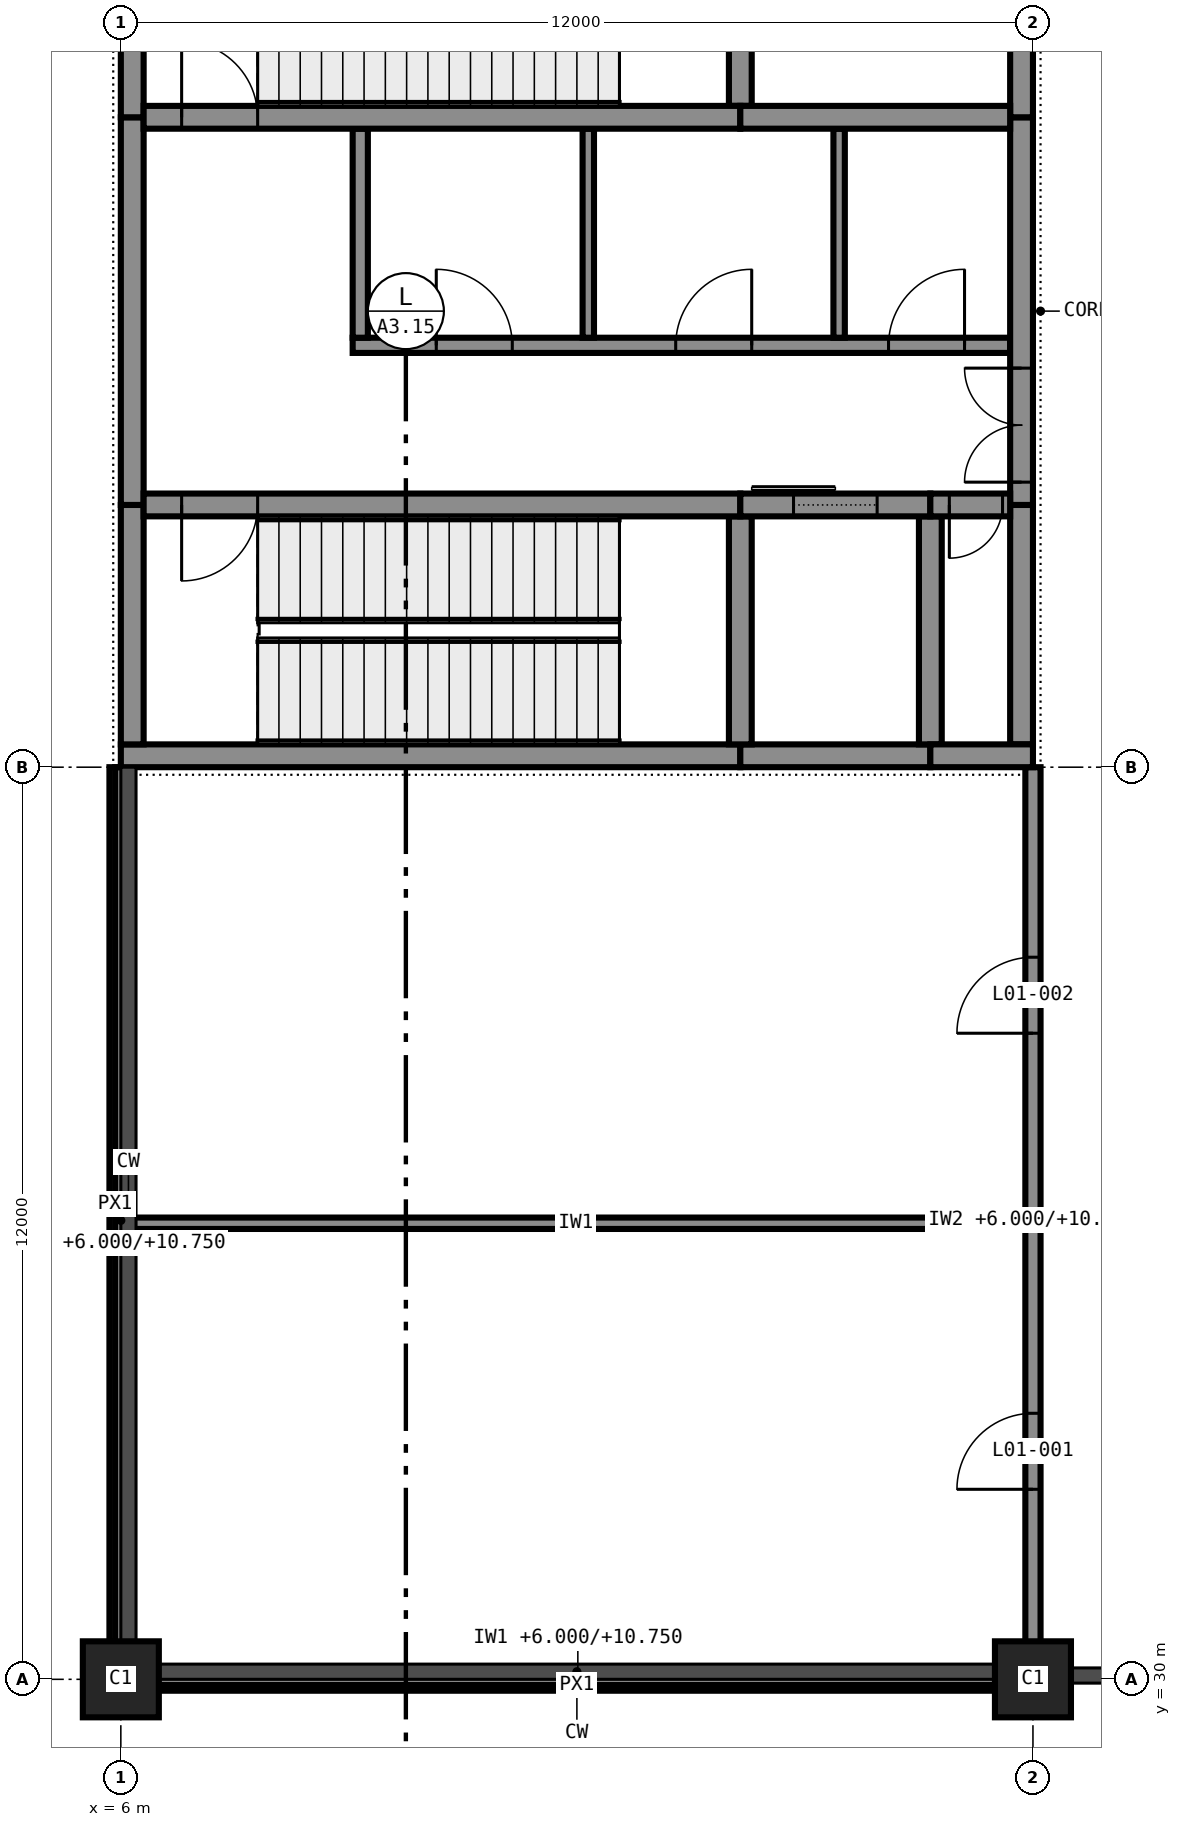
"""IFC4 building model, lengths in metres.
Left out: names, types, materials, properties, quantities, classifications, styles, units other than length and angle.
Written with IfcOpenShell. Run it as: python <this file> out.ifc"""

import sys

from ifc_helpers import new_model, si_unit, direction, frame, frame_2d, origin, origin_2d, place, context, subcontext, project, spatial, rectangle, extrude, element, fill, save


model = new_model("IFC4")
c1 = context("Model", 3, precision=1e-05, world=origin(), true_north=direction((0.0, 1.0)))
c2 = subcontext(c1, "Body", "Model", "MODEL_VIEW")
j1 = project(units=[si_unit("LENGTHUNIT", "METRE"), si_unit("PLANEANGLEUNIT", "RADIAN")], contexts=[c1])
p1 = place(None, origin())
s1 = spatial("IfcSite", under=j1, at=p1, CompositionType="ELEMENT")
p2 = place(p1, origin())
s2 = spatial("IfcBuilding", under=s1, at=p2, CompositionType="ELEMENT")
p3 = place(p2, frame((0.0, 0.0, 6.0)))
s3 = spatial("IfcBuildingStorey", under=s2, at=p3, CompositionType="ELEMENT", Elevation=6.0)
for number, where, z_axis, x_axis in (
    (1, (6.0, 30.0, 0.0), (0.0, 0.0, 1.0), (1.0, 0.0, 0.0)),
    (2, (18.0, 30.0, 0.0), (0.0, 0.0, 1.0), (1.0, 0.0, 0.0)),
):
    element("IfcColumn", number, at=place(p3, frame(where, z_axis=z_axis, x_axis=x_axis)), inside=s3, PredefinedType="COLUMN", context=c2, shape_type="SweptSolid", body=[
        extrude(rectangle(XDim=1.0, YDim=1.0, at=origin_2d()), origin(), (0.0, 0.0, 1.0), 6.0),
    ])
p4 = place(p3, frame((6.0, 42.15, 0.0), z_axis=(0.0, 0.0, 1.0), x_axis=(1.0, 0.0, 0.0)))
e3 = element("IfcWall", 3, at=p4, inside=s3, PredefinedType="SHEAR", context=c2, shape_type="SweptSolid", body=[
    extrude(rectangle(XDim=8.15, YDim=0.3, at=frame_2d((4.075, 0.0))), origin(), (0.0, 0.0, 1.0), 5.75),
])
p5 = place(p3, frame((14.15, 42.15, 0.0), z_axis=(0.0, 0.0, 1.0), x_axis=(1.0, 0.0, 0.0)))
e4 = element("IfcWall", 4, at=p5, inside=s3, PredefinedType="SHEAR", context=c2, shape_type="SweptSolid", body=[
    extrude(rectangle(XDim=2.5, YDim=0.3, at=frame_2d((1.25, 0.0))), origin(), (0.0, 0.0, 1.0), 5.75),
])
p6 = place(p3, frame((16.65, 42.15, 0.0), z_axis=(0.0, 0.0, 1.0), x_axis=(1.0, 0.0, 0.0)))
e5 = element("IfcWall", 5, at=p6, inside=s3, PredefinedType="SHEAR", context=c2, shape_type="SweptSolid", body=[
    extrude(rectangle(XDim=1.35, YDim=0.3, at=frame_2d((0.675, 0.0))), origin(), (0.0, 0.0, 1.0), 5.75),
])
p7 = place(p3, frame((6.3, 45.45, 0.0), z_axis=(0.0, 0.0, 1.0), x_axis=(1.0, 0.0, 0.0)))
e6 = element("IfcWall", 6, at=p7, inside=s3, PredefinedType="SHEAR", context=c2, shape_type="SweptSolid", body=[
    extrude(rectangle(XDim=7.85, YDim=0.3, at=frame_2d((3.925, 0.0))), origin(), (0.0, 0.0, 1.0), 5.75),
])
p8 = place(p7, frame((0.5, 0.0, 0.0)))
e7 = element("IfcOpeningElement", 7, at=p8, cuts=e6, PredefinedType="OPENING", context=c2, shape_type="SweptSolid", body=[
    extrude(rectangle(XDim=1.0, YDim=2.1, at=frame_2d((0.5, 1.05))), frame((0.0, 0.16, 0.0), z_axis=(0.0, -1.0, 0.0), x_axis=(1.0, 0.0, 0.0)), (0.0, 0.0, 1.0), 0.32),
])
p9 = place(p3, frame((14.15, 45.45, 0.0), z_axis=(0.0, 0.0, 1.0), x_axis=(1.0, 0.0, 0.0)))
e8 = element("IfcWall", 8, at=p9, inside=s3, PredefinedType="SHEAR", context=c2, shape_type="SweptSolid", body=[
    extrude(rectangle(XDim=2.5, YDim=0.3, at=frame_2d((1.25, 0.0))), origin(), (0.0, 0.0, 1.0), 5.75),
])
p10 = place(p9, frame((0.7, 0.0, 0.0)))
e9 = element("IfcOpeningElement", 9, at=p10, cuts=e8, PredefinedType="OPENING", context=c2, shape_type="SweptSolid", body=[
    extrude(rectangle(XDim=1.1, YDim=2.1, at=frame_2d((0.55, 1.05))), frame((0.0, 0.16, 0.0), z_axis=(0.0, -1.0, 0.0), x_axis=(1.0, 0.0, 0.0)), (0.0, 0.0, 1.0), 0.32),
])
p11 = place(p3, frame((16.65, 45.45, 0.0), z_axis=(0.0, 0.0, 1.0), x_axis=(1.0, 0.0, 0.0)))
e10 = element("IfcWall", 10, at=p11, inside=s3, PredefinedType="SHEAR", context=c2, shape_type="SweptSolid", body=[
    extrude(rectangle(XDim=1.05, YDim=0.3, at=frame_2d((0.525, 0.0))), origin(), (0.0, 0.0, 1.0), 5.75),
])
p12 = place(p11, frame((0.25, 0.0, 0.0)))
e11 = element("IfcOpeningElement", 11, at=p12, cuts=e10, PredefinedType="OPENING", context=c2, shape_type="SweptSolid", body=[
    extrude(rectangle(XDim=0.7, YDim=2.1, at=frame_2d((0.35, 1.05))), frame((0.0, 0.16, 0.0), z_axis=(0.0, -1.0, 0.0), x_axis=(1.0, 0.0, 0.0)), (0.0, 0.0, 1.0), 0.32),
])
p13 = place(p3, frame((6.3, 50.55, 0.0), z_axis=(0.0, 0.0, 1.0), x_axis=(1.0, 0.0, 0.0)))
e12 = element("IfcWall", 12, at=p13, inside=s3, PredefinedType="SHEAR", context=c2, shape_type="SweptSolid", body=[
    extrude(rectangle(XDim=7.85, YDim=0.3, at=frame_2d((3.925, 0.0))), origin(), (0.0, 0.0, 1.0), 5.75),
])
p14 = place(p13, frame((0.5, 0.0, 0.0)))
e13 = element("IfcOpeningElement", 13, at=p14, cuts=e12, PredefinedType="OPENING", context=c2, shape_type="SweptSolid", body=[
    extrude(rectangle(XDim=1.0, YDim=2.1, at=frame_2d((0.5, 1.05))), frame((0.0, 0.16, 0.0), z_axis=(0.0, -1.0, 0.0), x_axis=(1.0, 0.0, 0.0)), (0.0, 0.0, 1.0), 0.32),
])
p15 = place(p3, frame((14.15, 50.55, 0.0), z_axis=(0.0, 0.0, 1.0), x_axis=(1.0, 0.0, 0.0)))
e14 = element("IfcWall", 14, at=p15, inside=s3, PredefinedType="SHEAR", context=c2, shape_type="SweptSolid", body=[
    extrude(rectangle(XDim=3.55, YDim=0.3, at=frame_2d((1.775, 0.0))), origin(), (0.0, 0.0, 1.0), 5.75),
])
p16 = place(p3, frame((6.15, 42.3, 0.0), z_axis=(0.0, 0.0, 1.0), x_axis=(0.0, 1.0, 0.0)))
e15 = element("IfcWall", 15, at=p16, inside=s3, PredefinedType="SHEAR", context=c2, shape_type="SweptSolid", body=[
    extrude(rectangle(XDim=3.15, YDim=0.3, at=frame_2d((1.575, 0.0))), origin(), (0.0, 0.0, 1.0), 5.75),
])
p17 = place(p3, frame((6.15, 45.45, 0.0), z_axis=(0.0, 0.0, 1.0), x_axis=(0.0, 1.0, 0.0)))
e16 = element("IfcWall", 16, at=p17, inside=s3, PredefinedType="SHEAR", context=c2, shape_type="SweptSolid", body=[
    extrude(rectangle(XDim=5.1, YDim=0.3, at=frame_2d((2.55, 0.0))), origin(), (0.0, 0.0, 1.0), 5.75),
])
p18 = place(p3, frame((6.15, 50.55, 0.0), z_axis=(0.0, 0.0, 1.0), x_axis=(0.0, 1.0, 0.0)))
e17 = element("IfcWall", 17, at=p18, inside=s3, PredefinedType="SHEAR", context=c2, shape_type="SweptSolid", body=[
    extrude(rectangle(XDim=3.45, YDim=0.3, at=frame_2d((1.725, 0.0))), origin(), (0.0, 0.0, 1.0), 5.75),
])
p19 = place(p3, frame((17.85, 42.3, 0.0), z_axis=(0.0, 0.0, 1.0), x_axis=(0.0, 1.0, 0.0)))
e18 = element("IfcWall", 18, at=p19, inside=s3, PredefinedType="SHEAR", context=c2, shape_type="SweptSolid", body=[
    extrude(rectangle(XDim=3.15, YDim=0.3, at=frame_2d((1.575, 0.0))), origin(), (0.0, 0.0, 1.0), 5.75),
])
p20 = place(p3, frame((17.85, 45.45, 0.0), z_axis=(0.0, 0.0, 1.0), x_axis=(0.0, 1.0, 0.0)))
e19 = element("IfcWall", 19, at=p20, inside=s3, PredefinedType="SHEAR", context=c2, shape_type="SweptSolid", body=[
    extrude(rectangle(XDim=5.1, YDim=0.3, at=frame_2d((2.55, 0.0))), origin(), (0.0, 0.0, 1.0), 5.75),
])
p21 = place(p20, frame((0.3, 0.0, 0.0)))
e20 = element("IfcOpeningElement", 20, at=p21, cuts=e19, PredefinedType="OPENING", context=c2, shape_type="SweptSolid", body=[
    extrude(rectangle(XDim=1.5, YDim=2.1, at=frame_2d((0.75, 1.05))), frame((0.0, 0.16, 0.0), z_axis=(0.0, -1.0, 0.0), x_axis=(1.0, 0.0, 0.0)), (0.0, 0.0, 1.0), 0.32),
])
p22 = place(p3, frame((17.85, 50.55, 0.0), z_axis=(0.0, 0.0, 1.0), x_axis=(0.0, 1.0, 0.0)))
e21 = element("IfcWall", 21, at=p22, inside=s3, PredefinedType="SHEAR", context=c2, shape_type="SweptSolid", body=[
    extrude(rectangle(XDim=3.15, YDim=0.3, at=frame_2d((1.575, 0.0))), origin(), (0.0, 0.0, 1.0), 5.75),
])
p23 = place(p22, frame((1.15, 0.0, 0.0)))
e22 = element("IfcOpeningElement", 22, at=p23, cuts=e21, PredefinedType="OPENING", context=c2, shape_type="SweptSolid", body=[
    extrude(rectangle(XDim=1.0, YDim=2.1, at=frame_2d((0.5, 1.05))), frame((0.0, 0.16, 0.0), z_axis=(0.0, -1.0, 0.0), x_axis=(1.0, 0.0, 0.0)), (0.0, 0.0, 1.0), 0.32),
])
p24 = place(p3, frame((14.15, 42.3, 0.0), z_axis=(0.0, 0.0, 1.0), x_axis=(0.0, 1.0, 0.0)))
e23 = element("IfcWall", 23, at=p24, inside=s3, PredefinedType="SHEAR", context=c2, shape_type="SweptSolid", body=[
    extrude(rectangle(XDim=3.0, YDim=0.3, at=frame_2d((1.5, 0.0))), origin(), (0.0, 0.0, 1.0), 5.75),
])
p25 = place(p3, frame((14.15, 50.7, 0.0), z_axis=(0.0, 0.0, 1.0), x_axis=(0.0, 1.0, 0.0)))
e24 = element("IfcWall", 24, at=p25, inside=s3, PredefinedType="SHEAR", context=c2, shape_type="SweptSolid", body=[
    extrude(rectangle(XDim=3.3, YDim=0.3, at=frame_2d((1.65, 0.0))), origin(), (0.0, 0.0, 1.0), 5.75),
])
p26 = place(p3, frame((16.65, 42.3, 0.0), z_axis=(0.0, 0.0, 1.0), x_axis=(0.0, 1.0, 0.0)))
e25 = element("IfcWall", 25, at=p26, inside=s3, PredefinedType="SHEAR", context=c2, shape_type="SweptSolid", body=[
    extrude(rectangle(XDim=3.0, YDim=0.3, at=frame_2d((1.5, 0.0))), origin(), (0.0, 0.0, 1.0), 5.75),
])
p27 = place(p3, frame((5.925, 42.0, 5.75), z_axis=(0.0, 0.0, 1.0), x_axis=(0.0, -1.0, 0.0)))
e26 = element("IfcWall", 26, at=p27, inside=s3, PredefinedType="STANDARD", context=c2, shape_type="SweptSolid", body=[
    extrude(rectangle(XDim=11.5, YDim=0.15, at=frame_2d((5.75, 0.0))), origin(), (0.0, 0.0, 1.0), 0.25),
])
p28 = place(p3, frame((6.5, 29.925, 5.75), z_axis=(0.0, 0.0, 1.0), x_axis=(1.0, 0.0, 0.0)))
e27 = element("IfcWall", 27, at=p28, inside=s3, PredefinedType="STANDARD", context=c2, shape_type="SweptSolid", body=[
    extrude(rectangle(XDim=11.0, YDim=0.15, at=frame_2d((5.5, 0.0))), origin(), (0.0, 0.0, 1.0), 0.25),
])
p29 = place(p3, frame((5.925, 30.0, 0.0), z_axis=(0.0, 0.0, 1.0), x_axis=(1.0, 0.0, 0.0)))
e28 = element("IfcWall", 28, at=p29, inside=s3, PredefinedType="PARTITIONING", context=c2, shape_type="SweptSolid", body=[
    extrude(rectangle(XDim=12.175, YDim=0.15, at=frame_2d((6.087, 0.0))), origin(), (0.0, 0.0, 1.0), 4.75),
])
p30 = place(p3, frame((6.075, 36.0, 0.0), z_axis=(0.0, 0.0, 1.0), x_axis=(1.0, 0.0, 0.0)))
e29 = element("IfcWall", 29, at=p30, inside=s3, PredefinedType="PARTITIONING", context=c2, shape_type="SweptSolid", body=[
    extrude(rectangle(XDim=11.825, YDim=0.15, at=frame_2d((5.913, 0.0))), origin(), (0.0, 0.0, 1.0), 5.75),
])
p31 = place(p3, frame((9.05, 47.55, 0.0), z_axis=(0.0, 0.0, 1.0), x_axis=(1.0, 0.0, 0.0)))
e30 = element("IfcWall", 30, at=p31, inside=s3, PredefinedType="PARTITIONING", context=c2, shape_type="SweptSolid", body=[
    extrude(rectangle(XDim=8.65, YDim=0.2, at=frame_2d((4.325, 0.0))), origin(), (0.0, 0.0, 1.0), 5.75),
])
p32 = place(p31, frame((1.1, 0.0, 0.0)))
e31 = element("IfcOpeningElement", 31, at=p32, cuts=e30, PredefinedType="OPENING", context=c2, shape_type="SweptSolid", body=[
    extrude(rectangle(XDim=1.0, YDim=2.1, at=frame_2d((0.5, 1.05))), frame((0.0, 0.11, 0.0), z_axis=(0.0, -1.0, 0.0), x_axis=(1.0, 0.0, 0.0)), (0.0, 0.0, 1.0), 0.22),
])
p33 = place(p31, frame((4.25, 0.0, 0.0)))
e32 = element("IfcOpeningElement", 32, at=p33, cuts=e30, PredefinedType="OPENING", context=c2, shape_type="SweptSolid", body=[
    extrude(rectangle(XDim=1.0, YDim=2.1, at=frame_2d((0.5, 1.05))), frame((0.0, 0.11, 0.0), z_axis=(0.0, -1.0, 0.0), x_axis=(1.0, 0.0, 0.0)), (0.0, 0.0, 1.0), 0.22),
])
p34 = place(p31, frame((7.05, 0.0, 0.0)))
e33 = element("IfcOpeningElement", 33, at=p34, cuts=e30, PredefinedType="OPENING", context=c2, shape_type="SweptSolid", body=[
    extrude(rectangle(XDim=1.0, YDim=2.1, at=frame_2d((0.5, 1.05))), frame((0.0, 0.11, 0.0), z_axis=(0.0, -1.0, 0.0), x_axis=(1.0, 0.0, 0.0)), (0.0, 0.0, 1.0), 0.22),
])
p35 = place(p3, frame((6.0, 30.075, 0.0), z_axis=(0.0, 0.0, 1.0), x_axis=(0.0, 1.0, 0.0)))
e34 = element("IfcWall", 34, at=p35, inside=s3, PredefinedType="PARTITIONING", context=c2, shape_type="SweptSolid", body=[
    extrude(rectangle(XDim=11.925, YDim=0.15, at=frame_2d((5.962, 0.0))), origin(), (0.0, 0.0, 1.0), 4.75),
])
p36 = place(p3, frame((9.15, 47.65, 0.0), z_axis=(0.0, 0.0, 1.0), x_axis=(0.0, 1.0, 0.0)))
e35 = element("IfcWall", 35, at=p36, inside=s3, PredefinedType="PARTITIONING", context=c2, shape_type="SweptSolid", body=[
    extrude(rectangle(XDim=2.75, YDim=0.2, at=frame_2d((1.375, 0.0))), origin(), (0.0, 0.0, 1.0), 5.75),
])
for number, where, z_axis, x_axis in (
    (36, (12.15, 47.65, 0.0), (0.0, 0.0, 1.0), (0.0, 1.0, 0.0)),
    (37, (15.45, 47.65, 0.0), (0.0, 0.0, 1.0), (0.0, 1.0, 0.0)),
):
    element("IfcWall", number, at=place(p3, frame(where, z_axis=z_axis, x_axis=x_axis)), inside=s3, PredefinedType="PARTITIONING", context=c2, shape_type="SweptSolid", body=[
        extrude(rectangle(XDim=2.75, YDim=0.15, at=frame_2d((1.375, 0.0))), origin(), (0.0, 0.0, 1.0), 5.75),
    ])
p37 = place(p3, frame((18.0, 30.075, 0.0), z_axis=(0.0, 0.0, 1.0), x_axis=(0.0, 1.0, 0.0)))
e38 = element("IfcWall", 38, at=p37, inside=s3, PredefinedType="PARTITIONING", context=c2, shape_type="SweptSolid", body=[
    extrude(rectangle(XDim=11.925, YDim=0.2, at=frame_2d((5.962, 0.0))), origin(), (0.0, 0.0, 1.0), 4.75),
])
p38 = place(p37, frame((2.425, 0.0, 0.0)))
e39 = element("IfcOpeningElement", 39, at=p38, cuts=e38, PredefinedType="OPENING", context=c2, shape_type="SweptSolid", body=[
    extrude(rectangle(XDim=1.0, YDim=2.1, at=frame_2d((0.5, 1.05))), frame((0.0, 0.11, 0.0), z_axis=(0.0, -1.0, 0.0), x_axis=(1.0, 0.0, 0.0)), (0.0, 0.0, 1.0), 0.22),
])
p39 = place(p37, frame((8.425, 0.0, 0.0)))
e40 = element("IfcOpeningElement", 40, at=p39, cuts=e38, PredefinedType="OPENING", context=c2, shape_type="SweptSolid", body=[
    extrude(rectangle(XDim=1.0, YDim=2.1, at=frame_2d((0.5, 1.05))), frame((0.0, 0.11, 0.0), z_axis=(0.0, -1.0, 0.0), x_axis=(1.0, 0.0, 0.0)), (0.0, 0.0, 1.0), 0.22),
])
p40 = place(p38, origin())
e41 = element("IfcDoor", 41, at=p40, inside=s3, OperationType="SINGLE_SWING_RIGHT", PredefinedType="DOOR", context=c2, shape_type="SweptSolid", body=[
    extrude(rectangle(XDim=1.0, YDim=2.1, at=frame_2d((0.5, 1.05))), frame((0.0, 0.025, 0.0), z_axis=(0.0, -1.0, 0.0), x_axis=(1.0, 0.0, 0.0)), (0.0, 0.0, 1.0), 0.05),
])
fill(e39, e41)
p41 = place(p39, origin())
e42 = element("IfcDoor", 42, at=p41, inside=s3, OperationType="SINGLE_SWING_RIGHT", PredefinedType="DOOR", context=c2, shape_type="SweptSolid", body=[
    extrude(rectangle(XDim=1.0, YDim=2.1, at=frame_2d((0.5, 1.05))), frame((0.0, 0.025, 0.0), z_axis=(0.0, -1.0, 0.0), x_axis=(1.0, 0.0, 0.0)), (0.0, 0.0, 1.0), 0.05),
])
fill(e40, e42)
p42 = place(p8, frame((1.0, 0.0, 0.0), z_axis=(0.0, 0.0, 1.0), x_axis=(-1.0, 0.0, 0.0)))
e43 = element("IfcDoor", 43, at=p42, inside=s3, OperationType="SINGLE_SWING_LEFT", PredefinedType="DOOR", context=c2, shape_type="SweptSolid", body=[
    extrude(rectangle(XDim=1.0, YDim=2.1, at=frame_2d((0.5, 1.05))), frame((0.0, 0.025, 0.0), z_axis=(0.0, -1.0, 0.0), x_axis=(1.0, 0.0, 0.0)), (0.0, 0.0, 1.0), 0.05),
])
fill(e7, e43)
p43 = place(p10, origin())
e44 = element("IfcDoor", 44, at=p43, inside=s3, OperationType="SLIDING_TO_LEFT", PredefinedType="DOOR", context=c2, shape_type="SweptSolid", body=[
    extrude(rectangle(XDim=1.1, YDim=2.1, at=frame_2d((0.55, 1.05))), frame((0.0, 0.025, 0.0), z_axis=(0.0, -1.0, 0.0), x_axis=(1.0, 0.0, 0.0)), (0.0, 0.0, 1.0), 0.05),
])
fill(e9, e44)
p44 = place(p12, frame((0.7, 0.0, 0.0), z_axis=(0.0, 0.0, 1.0), x_axis=(-1.0, 0.0, 0.0)))
e45 = element("IfcDoor", 45, at=p44, inside=s3, OperationType="SINGLE_SWING_LEFT", PredefinedType="DOOR", context=c2, shape_type="SweptSolid", body=[
    extrude(rectangle(XDim=0.7, YDim=2.1, at=frame_2d((0.35, 1.05))), frame((0.0, 0.025, 0.0), z_axis=(0.0, -1.0, 0.0), x_axis=(1.0, 0.0, 0.0)), (0.0, 0.0, 1.0), 0.05),
])
fill(e11, e45)
p45 = place(p21, origin())
e46 = element("IfcDoor", 46, at=p45, inside=s3, OperationType="DOUBLE_DOOR_SINGLE_SWING", PredefinedType="DOOR", context=c2, shape_type="SweptSolid", body=[
    extrude(rectangle(XDim=1.5, YDim=2.1, at=frame_2d((0.75, 1.05))), frame((0.0, 0.025, 0.0), z_axis=(0.0, -1.0, 0.0), x_axis=(1.0, 0.0, 0.0)), (0.0, 0.0, 1.0), 0.05),
])
fill(e20, e46)
p46 = place(p32, origin())
e47 = element("IfcDoor", 47, at=p46, inside=s3, OperationType="SINGLE_SWING_RIGHT", PredefinedType="DOOR", context=c2, shape_type="SweptSolid", body=[
    extrude(rectangle(XDim=1.0, YDim=2.1, at=frame_2d((0.5, 1.05))), frame((0.0, 0.025, 0.0), z_axis=(0.0, -1.0, 0.0), x_axis=(1.0, 0.0, 0.0)), (0.0, 0.0, 1.0), 0.05),
])
fill(e31, e47)
p47 = place(p33, origin())
e48 = element("IfcDoor", 48, at=p47, inside=s3, OperationType="SINGLE_SWING_LEFT", PredefinedType="DOOR", context=c2, shape_type="SweptSolid", body=[
    extrude(rectangle(XDim=1.0, YDim=2.1, at=frame_2d((0.5, 1.05))), frame((0.0, 0.025, 0.0), z_axis=(0.0, -1.0, 0.0), x_axis=(1.0, 0.0, 0.0)), (0.0, 0.0, 1.0), 0.05),
])
fill(e32, e48)
p48 = place(p34, origin())
e49 = element("IfcDoor", 49, at=p48, inside=s3, OperationType="SINGLE_SWING_LEFT", PredefinedType="DOOR", context=c2, shape_type="SweptSolid", body=[
    extrude(rectangle(XDim=1.0, YDim=2.1, at=frame_2d((0.5, 1.05))), frame((0.0, 0.025, 0.0), z_axis=(0.0, -1.0, 0.0), x_axis=(1.0, 0.0, 0.0)), (0.0, 0.0, 1.0), 0.05),
])
fill(e33, e49)
p49 = place(p14, origin())
e50 = element("IfcDoor", 50, at=p49, inside=s3, OperationType="SINGLE_SWING_RIGHT", PredefinedType="DOOR", context=c2, shape_type="SweptSolid", body=[
    extrude(rectangle(XDim=1.0, YDim=2.1, at=frame_2d((0.5, 1.05))), frame((0.0, 0.025, 0.0), z_axis=(0.0, -1.0, 0.0), x_axis=(1.0, 0.0, 0.0)), (0.0, 0.0, 1.0), 0.05),
])
fill(e13, e50)
save(model, sys.argv[1])
